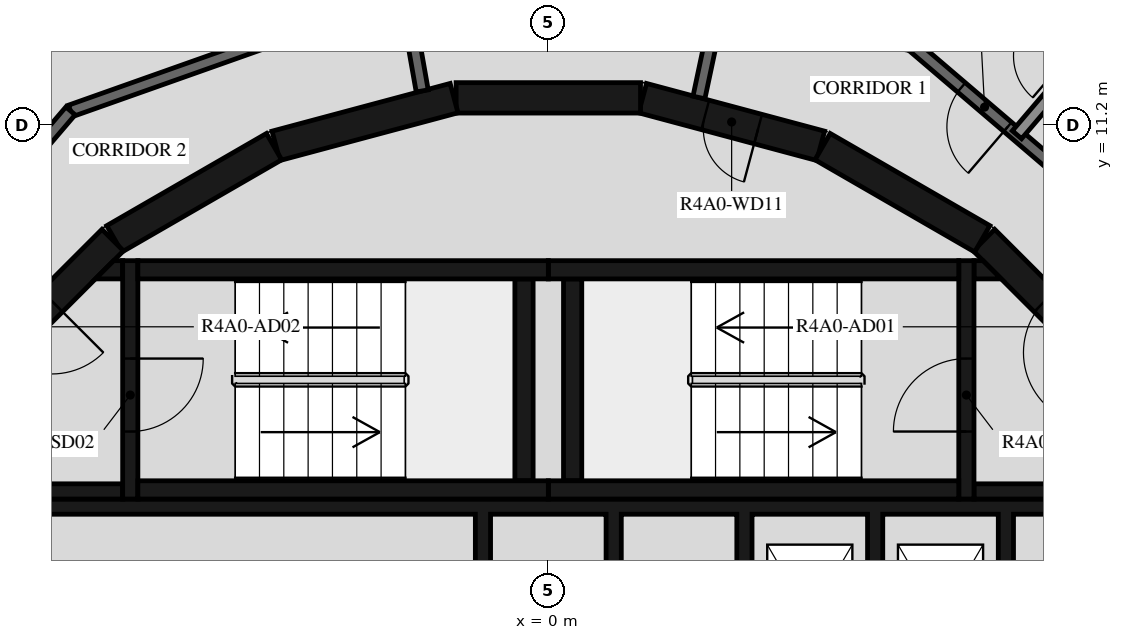
"""IFC4 building model, lengths in metres.
Left out: names, types, materials, properties, quantities, classifications, styles, units other than length and angle.
Written with IfcOpenShell. Run it as: python <this file> out.ifc"""

import sys

from ifc_helpers import new_model, si_unit, direction, frame, frame_2d, origin, place, context, subcontext, project, spatial, polyline, rectangle, outline, extrude, element, fill, save


model = new_model("IFC4")
c1 = context("Model", 3, precision=1e-05, world=origin(), true_north=direction((0.0, 1.0)))
c2 = subcontext(c1, "Body", "Model", "MODEL_VIEW")
j1 = project(units=[si_unit("LENGTHUNIT", "METRE"), si_unit("PLANEANGLEUNIT", "RADIAN")], contexts=[c1])
p1 = place(None, origin())
s1 = spatial("IfcSite", under=j1, at=p1, CompositionType="ELEMENT")
p2 = place(p1, origin())
s2 = spatial("IfcBuilding", under=s1, at=p2, CompositionType="ELEMENT")
p3 = place(p2, frame((0.0, 0.0, 151.7)))
s3 = spatial("IfcBuildingStorey", under=s2, at=p3, CompositionType="ELEMENT", Elevation=151.7)
p4 = place(p3, frame((9.308, 7.164, 0.0), z_axis=(0.0, 0.0, 1.0), x_axis=(-0.707106781187, 0.707106781187, 0.0)))
e1 = element("IfcWall", 1, at=p4, inside=s3, PredefinedType="SHEAR", context=c2, shape_type="SweptSolid", body=[
    extrude(rectangle(XDim=3.032, YDim=0.5, at=frame_2d((1.516, 0.0))), origin(), (0.0, 0.0, 1.0), 3.12),
])
p5 = place(p4, frame((0.416, 0.0, 0.0)))
e2 = element("IfcOpeningElement", 2, at=p5, cuts=e1, PredefinedType="OPENING", context=c2, shape_type="SweptSolid", body=[
    extrude(rectangle(XDim=1.2, YDim=2.1, at=frame_2d((0.6, 1.05))), frame((0.0, 0.26, 0.0), z_axis=(0.0, -1.0, 0.0), x_axis=(1.0, 0.0, 0.0)), (0.0, 0.0, 1.0), 0.52),
])
p6 = place(p3, frame((7.137, 9.329, 0.0), z_axis=(0.0, 0.0, 1.0), x_axis=(-0.865975092491, 0.500087131594, 0.0)))
e3 = element("IfcWall", 3, at=p6, inside=s3, PredefinedType="SHEAR", context=c2, shape_type="SweptSolid", body=[
    extrude(rectangle(XDim=3.033, YDim=0.5, at=frame_2d((1.516, 0.0))), origin(), (0.0, 0.0, 1.0), 3.12),
])
p7 = place(p3, frame((4.479, 10.858, 0.0), z_axis=(0.0, 0.0, 1.0), x_axis=(-0.965948410781, 0.258734743916, 0.0)))
e4 = element("IfcWall", 4, at=p7, inside=s3, PredefinedType="SHEAR", context=c2, shape_type="SweptSolid", body=[
    extrude(rectangle(XDim=3.033, YDim=0.5, at=frame_2d((1.516, 0.0))), origin(), (0.0, 0.0, 1.0), 3.12),
])
p8 = place(p7, frame((1.066, 0.0, 0.0)))
e5 = element("IfcOpeningElement", 5, at=p8, cuts=e4, PredefinedType="OPENING", context=c2, shape_type="SweptSolid", body=[
    extrude(rectangle(XDim=0.9, YDim=2.1, at=frame_2d((0.45, 1.05))), frame((0.0, 0.26, 0.0), z_axis=(0.0, -1.0, 0.0), x_axis=(1.0, 0.0, 0.0)), (0.0, 0.0, 1.0), 0.52),
])
for number, where, z_axis, x_axis in (
    (6, (1.516, 11.647, 0.0), (0.0, 0.0, 1.0), (-1.0, 0.0, 0.0)),
    (7, (-1.55, 11.643, 0.0), (0.0, 0.0, 1.0), (-0.966, -0.259, 0.0)),
    (8, (-4.51, 10.845, 0.0), (0.0, 0.0, 1.0), (-0.866, -0.5, 0.0)),
):
    element("IfcWall", number, at=place(p3, frame(where, z_axis=z_axis, x_axis=x_axis)), inside=s3, PredefinedType="SHEAR", context=c2, shape_type="SweptSolid", body=[
        extrude(rectangle(XDim=3.033, YDim=0.5, at=frame_2d((1.516, 0.0))), origin(), (0.0, 0.0, 1.0), 3.12),
    ])
p9 = place(p3, frame((-7.164, 9.308, 0.0), z_axis=(0.0, 0.0, 1.0), x_axis=(-0.707106781187, -0.707106781187, 0.0)))
e9 = element("IfcWall", 9, at=p9, inside=s3, PredefinedType="SHEAR", context=c2, shape_type="SweptSolid", body=[
    extrude(rectangle(XDim=3.032, YDim=0.5, at=frame_2d((1.516, 0.0))), origin(), (0.0, 0.0, 1.0), 3.12),
])
p10 = place(p9, frame((1.416, 0.0, 0.0)))
e10 = element("IfcOpeningElement", 10, at=p10, cuts=e9, PredefinedType="OPENING", context=c2, shape_type="SweptSolid", body=[
    extrude(rectangle(XDim=1.2, YDim=2.1, at=frame_2d((0.6, 1.05))), frame((0.0, 0.26, 0.0), z_axis=(0.0, -1.0, 0.0), x_axis=(1.0, 0.0, 0.0)), (0.0, 0.0, 1.0), 0.52),
])
for number, where, z_axis, x_axis in (
    (11, (0.0, 5.2, 0.0), (0.0, 0.0, 1.0), (1.0, 0.0, 0.0)),
    (12, (0.0, 8.82, 0.0), (0.0, 0.0, 1.0), (1.0, 0.0, 0.0)),
):
    element("IfcWall", number, at=place(p3, frame(where, z_axis=z_axis, x_axis=x_axis)), inside=s3, PredefinedType="SHEAR", context=c2, shape_type="SweptSolid", body=[
        extrude(rectangle(XDim=6.75, YDim=0.3, at=frame_2d((3.375, 0.0))), origin(), (0.0, 0.0, 1.0), 3.12),
    ])
p11 = place(p3, frame((0.4, 5.35, 0.0), z_axis=(0.0, 0.0, 1.0), x_axis=(0.0, 1.0, 0.0)))
e13 = element("IfcWall", 13, at=p11, inside=s3, PredefinedType="SHEAR", context=c2, shape_type="SweptSolid", body=[
    extrude(rectangle(XDim=3.32, YDim=0.3, at=frame_2d((1.66, 0.0))), origin(), (0.0, 0.0, 1.0), 3.12),
])
p12 = place(p3, frame((6.875, 5.05, 0.0), z_axis=(0.0, 0.0, 1.0), x_axis=(0.0, 1.0, 0.0)))
e14 = element("IfcWall", 14, at=p12, inside=s3, PredefinedType="SHEAR", context=c2, shape_type="SweptSolid", body=[
    extrude(rectangle(XDim=3.92, YDim=0.25, at=frame_2d((1.96, 0.0))), origin(), (0.0, 0.0, 1.0), 3.12),
])
p13 = place(p12, frame((1.11, 0.0, 0.0)))
e15 = element("IfcOpeningElement", 15, at=p13, cuts=e14, PredefinedType="OPENING", context=c2, shape_type="SweptSolid", body=[
    extrude(rectangle(XDim=1.2, YDim=2.1, at=frame_2d((0.6, 1.05))), frame((0.0, 0.135, 0.0), z_axis=(0.0, -1.0, 0.0), x_axis=(1.0, 0.0, 0.0)), (0.0, 0.0, 1.0), 0.27),
])
p14 = place(p3, frame((7.0, 5.175, 0.0), z_axis=(0.0, 0.0, 1.0), x_axis=(1.0, 0.0, 0.0)))
e16 = element("IfcWall", 16, at=p14, inside=s3, PredefinedType="SHEAR", context=c2, shape_type="SweptSolid", body=[
    extrude(rectangle(XDim=3.1, YDim=0.25, at=frame_2d((1.55, 0.0))), origin(), (0.0, 0.0, 1.0), 3.12),
])
p15 = place(p3, origin())
e17 = element("IfcWall", 17, at=p15, inside=s3, PredefinedType="SHEAR", context=c2, shape_type="SweptSolid", body=[
    extrude(outline(polyline([(7.448, 8.67), (7.0, 8.67), (7.0, 8.97), (7.148, 8.97), (7.448, 8.67)])), origin(), (0.0, 0.0, 1.0), 3.12),
])
for number, where, z_axis, x_axis in (
    (18, (-6.75, 5.2, 0.0), (0.0, 0.0, 1.0), (1.0, 0.0, 0.0)),
    (19, (-6.75, 8.82, 0.0), (0.0, 0.0, 1.0), (1.0, 0.0, 0.0)),
):
    element("IfcWall", number, at=place(p3, frame(where, z_axis=z_axis, x_axis=x_axis)), inside=s3, PredefinedType="SHEAR", context=c2, shape_type="SweptSolid", body=[
        extrude(rectangle(XDim=6.75, YDim=0.3, at=frame_2d((3.375, 0.0))), origin(), (0.0, 0.0, 1.0), 3.12),
    ])
p16 = place(p3, frame((-0.4, 5.35, 0.0), z_axis=(0.0, 0.0, 1.0), x_axis=(0.0, 1.0, 0.0)))
e20 = element("IfcWall", 20, at=p16, inside=s3, PredefinedType="SHEAR", context=c2, shape_type="SweptSolid", body=[
    extrude(rectangle(XDim=3.32, YDim=0.3, at=frame_2d((1.66, 0.0))), origin(), (0.0, 0.0, 1.0), 3.12),
])
p17 = place(p3, frame((-6.875, 8.97, 0.0), z_axis=(0.0, 0.0, 1.0), x_axis=(0.0, -1.0, 0.0)))
e21 = element("IfcWall", 21, at=p17, inside=s3, PredefinedType="SHEAR", context=c2, shape_type="SweptSolid", body=[
    extrude(rectangle(XDim=3.92, YDim=0.25, at=frame_2d((1.96, 0.0))), origin(), (0.0, 0.0, 1.0), 3.12),
])
p18 = place(p17, frame((1.61, 0.0, 0.0)))
e22 = element("IfcOpeningElement", 22, at=p18, cuts=e21, PredefinedType="OPENING", context=c2, shape_type="SweptSolid", body=[
    extrude(rectangle(XDim=1.2, YDim=2.1, at=frame_2d((0.6, 1.05))), frame((0.0, 0.135, 0.0), z_axis=(0.0, -1.0, 0.0), x_axis=(1.0, 0.0, 0.0)), (0.0, 0.0, 1.0), 0.27),
])
p19 = place(p3, frame((-7.0, 5.175, 0.0), z_axis=(0.0, 0.0, 1.0), x_axis=(-1.0, 0.0, 0.0)))
e23 = element("IfcWall", 23, at=p19, inside=s3, PredefinedType="SHEAR", context=c2, shape_type="SweptSolid", body=[
    extrude(rectangle(XDim=3.1, YDim=0.25, at=frame_2d((1.55, 0.0))), origin(), (0.0, 0.0, 1.0), 3.12),
])
p20 = place(p3, origin())
e24 = element("IfcWall", 24, at=p20, inside=s3, PredefinedType="SHEAR", context=c2, shape_type="SweptSolid", body=[
    extrude(outline(polyline([(-7.148, 8.97), (-7.0, 8.97), (-7.0, 8.67), (-7.448, 8.67), (-7.148, 8.97)])), origin(), (0.0, 0.0, 1.0), 3.12),
])
p21 = place(p3, origin())
e25 = element("IfcWall", 25, at=p21, inside=s3, PredefinedType="SHEAR", context=c2, shape_type="SweptSolid", body=[
    extrude(outline(polyline([(-9.55, 4.8), (-1.2, 4.8), (-1.2, 1.9), (-0.95, 1.9), (-0.95, 4.8), (0.95, 4.8), (0.95, 1.9), (1.2, 1.9), (1.2, 4.8), (3.1, 4.8), (3.1, 1.9), (3.35, 1.9), (3.35, 4.8), (5.25, 4.8), (5.25, 1.9), (5.5, 1.9), (5.5, 4.8), (7.4, 4.8), (7.4, 1.9), (7.65, 1.9), (7.65, 4.8), (9.55, 4.8), (9.55, 1.9), (9.8, 1.9), (9.8, 4.8), (9.8, 5.05), (-9.8, 5.05), (-9.8, 4.8), (-9.8, 1.9), (-9.55, 1.9), (-9.55, 4.8)])), origin(), (0.0, 0.0, 1.0), 3.12),
])
p22 = place(p3, frame((11.433, 7.858, 0.0), z_axis=(0.0, 0.0, 1.0), x_axis=(-0.760412154545, 0.649440801937, 0.0)))
e26 = element("IfcWall", 26, at=p22, inside=s3, PredefinedType="STANDARD", context=c2, shape_type="SweptSolid", body=[
    extrude(rectangle(XDim=7.181, YDim=0.2, at=frame_2d((3.59, 0.0))), origin(), (0.0, 0.0, 1.0), 3.12),
])
p23 = place(p22, frame((1.7, 0.0, 0.0)))
e27 = element("IfcOpeningElement", 27, at=p23, cuts=e26, PredefinedType="OPENING", context=c2, shape_type="SweptSolid", body=[
    extrude(rectangle(XDim=1.0, YDim=2.1, at=frame_2d((0.5, 1.05))), frame((0.0, 0.11, 0.0), z_axis=(0.0, -1.0, 0.0), x_axis=(1.0, 0.0, 0.0)), (0.0, 0.0, 1.0), 0.22),
])
p24 = place(p22, frame((5.101, 0.0, 0.0)))
e28 = element("IfcOpeningElement", 28, at=p24, cuts=e26, PredefinedType="OPENING", context=c2, shape_type="SweptSolid", body=[
    extrude(rectangle(XDim=1.0, YDim=2.1, at=frame_2d((0.5, 1.05))), frame((0.0, 0.11, 0.0), z_axis=(0.0, -1.0, 0.0), x_axis=(1.0, 0.0, 0.0)), (0.0, 0.0, 1.0), 0.22),
])
p25 = place(p3, frame((2.787, 13.112, 0.0), z_axis=(0.0, 0.0, 1.0), x_axis=(-0.207941001029, -0.978141370197, 0.0)))
e29 = element("IfcWall", 29, at=p25, inside=s3, PredefinedType="STANDARD", context=c2, shape_type="SweptSolid", body=[
    extrude(rectangle(XDim=1.491, YDim=0.2, at=frame_2d((0.746, 0.0))), origin(), (0.0, 0.0, 1.0), 3.12),
])
p26 = place(p3, frame((-2.074, 11.761, 0.0), z_axis=(0.0, 0.0, 1.0), x_axis=(-0.1736412798, 0.984808969267, 0.0)))
e30 = element("IfcWall", 30, at=p26, inside=s3, PredefinedType="STANDARD", context=c2, shape_type="SweptSolid", body=[
    extrude(rectangle(XDim=1.644, YDim=0.2, at=frame_2d((0.822, 0.0))), origin(), (0.0, 0.0, 1.0), 3.12),
])
p27 = place(p3, frame((-2.359, 13.38, 0.0), z_axis=(0.0, 0.0, 1.0), x_axis=(-0.942647529236, -0.333789807551, 0.0)))
e31 = element("IfcWall", 31, at=p27, inside=s3, PredefinedType="STANDARD", context=c2, shape_type="SweptSolid", body=[
    extrude(rectangle(XDim=5.833, YDim=0.2, at=frame_2d((2.917, 0.0))), origin(), (0.0, 0.0, 1.0), 3.12),
])
p28 = place(p3, frame((-7.858, 11.433, 0.0), z_axis=(0.0, 0.0, 1.0), x_axis=(-0.649440801937, -0.760412154545, 0.0)))
e32 = element("IfcWall", 32, at=p28, inside=s3, PredefinedType="STANDARD", context=c2, shape_type="SweptSolid", body=[
    extrude(rectangle(XDim=7.181, YDim=0.2, at=frame_2d((3.59, 0.0))), origin(), (0.0, 0.0, 1.0), 3.12),
])
p29 = place(p28, frame((2.6, 0.0, 0.0)))
e33 = element("IfcOpeningElement", 33, at=p29, cuts=e32, PredefinedType="OPENING", context=c2, shape_type="SweptSolid", body=[
    extrude(rectangle(XDim=1.0, YDim=2.1, at=frame_2d((0.5, 1.05))), frame((0.0, 0.11, 0.0), z_axis=(0.0, -1.0, 0.0), x_axis=(1.0, 0.0, 0.0)), (0.0, 0.0, 1.0), 0.22),
])
p30 = place(p3, frame((11.04, 14.943, 0.0), z_axis=(0.0, 0.0, 1.0), x_axis=(-0.649442880087, -0.760410379666, 0.0)))
e34 = element("IfcWall", 34, at=p30, inside=s3, PredefinedType="STANDARD", context=c2, shape_type="SweptSolid", body=[
    extrude(rectangle(XDim=5.133, YDim=0.2, at=frame_2d((2.566, 0.0))), origin(), (0.0, 0.0, 1.0), 2.73),
])
p31 = place(p3, frame((8.702, 12.206, 0.0), z_axis=(0.0, 0.0, 1.0), x_axis=(-0.760401313718, 0.649453494945, 0.0)))
e35 = element("IfcWall", 35, at=p31, inside=s3, PredefinedType="PARTITIONING", context=c2, shape_type="SweptSolid", body=[
    extrude(rectangle(XDim=16.724, YDim=0.12, at=frame_2d((8.362, 0.0))), origin(), (0.0, 0.0, 1.0), 3.12),
])
p32 = place(p31, frame((0.2, 0.0, 0.0)))
e36 = element("IfcOpeningElement", 36, at=p32, cuts=e35, PredefinedType="OPENING", context=c2, shape_type="SweptSolid", body=[
    extrude(rectangle(XDim=0.9, YDim=2.1, at=frame_2d((0.45, 1.05))), frame((0.0, 0.07, 0.0), z_axis=(0.0, -1.0, 0.0), x_axis=(1.0, 0.0, 0.0)), (0.0, 0.0, 1.0), 0.14),
])
p33 = place(p31, frame((7.099, 0.0, 0.0)))
e37 = element("IfcOpeningElement", 37, at=p33, cuts=e35, PredefinedType="OPENING", context=c2, shape_type="SweptSolid", body=[
    extrude(rectangle(XDim=0.9, YDim=2.1, at=frame_2d((0.45, 1.05))), frame((0.0, 0.07, 0.0), z_axis=(0.0, -1.0, 0.0), x_axis=(1.0, 0.0, 0.0)), (0.0, 0.0, 1.0), 0.14),
])
p34 = place(p13, origin())
e38 = element("IfcDoor", 38, at=p34, inside=s3, OperationType="SINGLE_SWING_LEFT", PredefinedType="DOOR", context=c2, shape_type="SweptSolid", body=[
    extrude(rectangle(XDim=1.2, YDim=2.1, at=frame_2d((0.6, 1.05))), frame((0.0, 0.025, 0.0), z_axis=(0.0, -1.0, 0.0), x_axis=(1.0, 0.0, 0.0)), (0.0, 0.0, 1.0), 0.05),
])
fill(e15, e38)
p35 = place(p5, origin())
e39 = element("IfcDoor", 39, at=p35, inside=s3, OperationType="SINGLE_SWING_RIGHT", PredefinedType="DOOR", context=c2, shape_type="SweptSolid", body=[
    extrude(rectangle(XDim=1.2, YDim=2.1, at=frame_2d((0.6, 1.05))), frame((0.0, 0.025, 0.0), z_axis=(0.0, -1.0, 0.0), x_axis=(1.0, 0.0, 0.0)), (0.0, 0.0, 1.0), 0.05),
])
fill(e2, e39)
p36 = place(p18, origin())
e40 = element("IfcDoor", 40, at=p36, inside=s3, OperationType="SINGLE_SWING_LEFT", PredefinedType="DOOR", context=c2, shape_type="SweptSolid", body=[
    extrude(rectangle(XDim=1.2, YDim=2.1, at=frame_2d((0.6, 1.05))), frame((0.0, 0.025, 0.0), z_axis=(0.0, -1.0, 0.0), x_axis=(1.0, 0.0, 0.0)), (0.0, 0.0, 1.0), 0.05),
])
fill(e22, e40)
p37 = place(p10, origin())
e41 = element("IfcDoor", 41, at=p37, inside=s3, OperationType="SINGLE_SWING_RIGHT", PredefinedType="DOOR", context=c2, shape_type="SweptSolid", body=[
    extrude(rectangle(XDim=1.2, YDim=2.1, at=frame_2d((0.6, 1.05))), frame((0.0, 0.025, 0.0), z_axis=(0.0, -1.0, 0.0), x_axis=(1.0, 0.0, 0.0)), (0.0, 0.0, 1.0), 0.05),
])
fill(e10, e41)
p38 = place(p8, origin())
e42 = element("IfcDoor", 42, at=p38, inside=s3, OperationType="SINGLE_SWING_LEFT", PredefinedType="DOOR", context=c2, shape_type="SweptSolid", body=[
    extrude(rectangle(XDim=0.9, YDim=2.1, at=frame_2d((0.45, 1.05))), frame((0.0, 0.025, 0.0), z_axis=(0.0, -1.0, 0.0), x_axis=(1.0, 0.0, 0.0)), (0.0, 0.0, 1.0), 0.05),
])
fill(e5, e42)
p39 = place(p24, origin())
e43 = element("IfcDoor", 43, at=p39, inside=s3, OperationType="SINGLE_SWING_RIGHT", PredefinedType="DOOR", context=c2, shape_type="SweptSolid", body=[
    extrude(rectangle(XDim=1.0, YDim=2.1, at=frame_2d((0.5, 1.05))), frame((0.0, 0.025, 0.0), z_axis=(0.0, -1.0, 0.0), x_axis=(1.0, 0.0, 0.0)), (0.0, 0.0, 1.0), 0.05),
])
fill(e28, e43)
p40 = place(p32, origin())
e44 = element("IfcDoor", 44, at=p40, inside=s3, OperationType="SINGLE_SWING_RIGHT", PredefinedType="DOOR", context=c2, shape_type="SweptSolid", body=[
    extrude(rectangle(XDim=0.9, YDim=2.1, at=frame_2d((0.45, 1.05))), frame((0.0, 0.025, 0.0), z_axis=(0.0, -1.0, 0.0), x_axis=(1.0, 0.0, 0.0)), (0.0, 0.0, 1.0), 0.05),
])
fill(e36, e44)
save(model, sys.argv[1])
